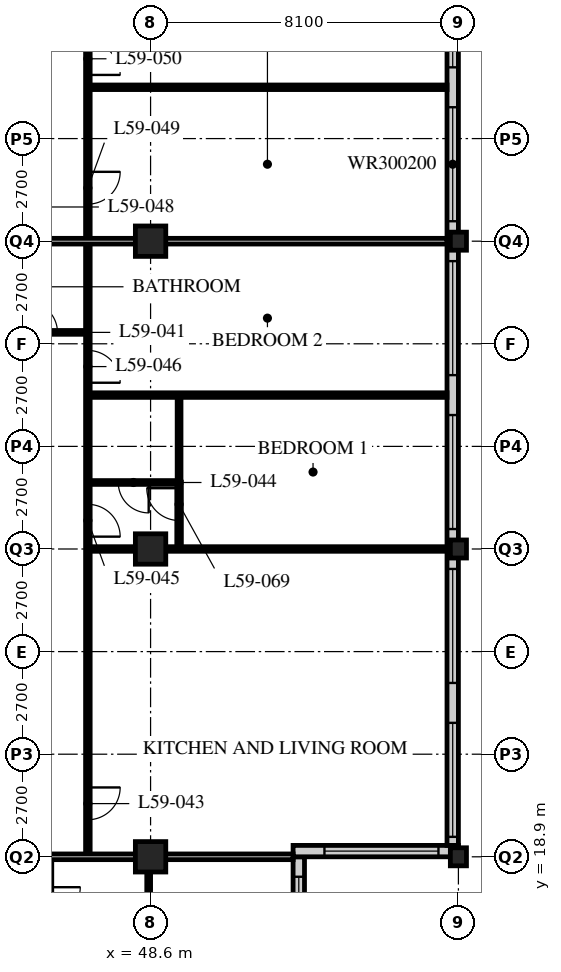
"""IFC4 building model, lengths in metres.
Left out: names, types, materials, properties, quantities, classifications, styles, units other than length and angle.
Written with IfcOpenShell. Run it as: python <this file> out.ifc"""

import sys

from ifc_helpers import new_model, si_unit, direction, frame, frame_2d, origin, origin_2d, place, context, subcontext, project, spatial, rectangle, hollow_rectangle, i_section, extrude, element, fill, save


model = new_model("IFC4")
c1 = context("Model", 3, precision=1e-05, world=origin(), true_north=direction((0.0, 1.0)))
c2 = subcontext(c1, "Body", "Model", "MODEL_VIEW")
j1 = project(units=[si_unit("LENGTHUNIT", "METRE"), si_unit("PLANEANGLEUNIT", "RADIAN")], contexts=[c1])
p1 = place(None, origin())
s1 = spatial("IfcSite", under=j1, at=p1, CompositionType="ELEMENT")
p2 = place(p1, origin())
s2 = spatial("IfcBuilding", under=s1, at=p2, CompositionType="ELEMENT")
p3 = place(p2, frame((0.0, 0.0, 228.0)))
s3 = spatial("IfcBuildingStorey", under=s2, at=p3, CompositionType="ELEMENT", Elevation=228.0)
for number, where, z_axis, x_axis in (
    (1, (48.6, 18.9, 0.0), (0.0, 0.0, 1.0), (1.0, 0.0, 0.0)),
    (2, (48.6, 27.0, 0.0), (0.0, 0.0, 1.0), (1.0, 0.0, 0.0)),
    (3, (48.6, 35.1, 0.0), (0.0, 0.0, 1.0), (1.0, 0.0, 0.0)),
):
    element("IfcColumn", number, at=place(p3, frame(where, z_axis=z_axis, x_axis=x_axis)), inside=s3, PredefinedType="COLUMN", context=c2, shape_type="SweptSolid", body=[
        extrude(hollow_rectangle(XDim=0.8, YDim=0.8, WallThickness=0.08, at=origin_2d()), origin(), (0.0, 0.0, 1.0), 3.6),
    ])
for number, where, z_axis, x_axis in (
    (4, (56.7, 18.9, 0.0), (0.0, 0.0, 1.0), (1.0, 0.0, 0.0)),
    (5, (56.7, 27.0, 0.0), (0.0, 0.0, 1.0), (1.0, 0.0, 0.0)),
    (6, (56.7, 35.1, 0.0), (0.0, 0.0, 1.0), (1.0, 0.0, 0.0)),
):
    element("IfcColumn", number, at=place(p3, frame(where, z_axis=z_axis, x_axis=x_axis)), inside=s3, PredefinedType="COLUMN", context=c2, shape_type="SweptSolid", body=[
        extrude(i_section(OverallWidth=0.424, OverallDepth=0.475, WebThickness=0.048, FlangeThickness=0.077, FilletRadius=0.015, at=origin_2d()), origin(), (0.0, 0.0, 1.0), 3.6),
    ])
p4 = place(p3, frame((52.5, 15.15, 0.0), z_axis=(0.0, 0.0, 1.0), x_axis=(0.0, 1.0, 0.0)))
e7 = element("IfcWall", 7, at=p4, inside=s3, PredefinedType="SOLIDWALL", context=c2, shape_type="SweptSolid", body=[
    extrude(rectangle(XDim=3.75, YDim=0.3, at=frame_2d((1.875, 0.0))), origin(), (0.0, 0.0, 1.0), 3.39),
])
p5 = place(p4, frame((0.225, 0.0, 0.6)))
e8 = element("IfcOpeningElement", 8, at=p5, cuts=e7, PredefinedType="OPENING", context=c2, shape_type="SweptSolid", body=[
    extrude(rectangle(XDim=3.0, YDim=2.0, at=frame_2d((1.5, 1.0))), frame((0.0, 0.16, 0.0), z_axis=(0.0, -1.0, 0.0), x_axis=(1.0, 0.0, 0.0)), (0.0, 0.0, 1.0), 0.32),
])
p6 = place(p3, frame((52.35, 19.05, 0.0), z_axis=(0.0, 0.0, 1.0), x_axis=(1.0, 0.0, 0.0)))
e9 = element("IfcWall", 9, at=p6, inside=s3, PredefinedType="SOLIDWALL", context=c2, shape_type="SweptSolid", body=[
    extrude(rectangle(XDim=4.35, YDim=0.3, at=frame_2d((2.175, 0.0))), origin(), (0.0, 0.0, 1.0), 3.39),
])
p7 = place(p6, frame((0.825, 0.0, 0.6)))
e10 = element("IfcOpeningElement", 10, at=p7, cuts=e9, PredefinedType="OPENING", context=c2, shape_type="SweptSolid", body=[
    extrude(rectangle(XDim=3.0, YDim=2.0, at=frame_2d((1.5, 1.0))), frame((0.0, 0.16, 0.0), z_axis=(0.0, -1.0, 0.0), x_axis=(1.0, 0.0, 0.0)), (0.0, 0.0, 1.0), 0.32),
])
p8 = place(p3, frame((56.55, 19.2, 0.0), z_axis=(0.0, 0.0, 1.0), x_axis=(0.0, 1.0, 0.0)))
e11 = element("IfcWall", 11, at=p8, inside=s3, PredefinedType="SOLIDWALL", context=c2, shape_type="SweptSolid", body=[
    extrude(rectangle(XDim=32.1, YDim=0.3, at=frame_2d((16.05, 0.0))), origin(), (0.0, 0.0, 1.0), 3.39),
])
p9 = place(p8, frame((0.225, 0.0, 0.6)))
e12 = element("IfcOpeningElement", 12, at=p9, cuts=e11, PredefinedType="OPENING", context=c2, shape_type="SweptSolid", body=[
    extrude(rectangle(XDim=3.0, YDim=2.0, at=frame_2d((1.5, 1.0))), frame((0.0, 0.16, 0.0), z_axis=(0.0, -1.0, 0.0), x_axis=(1.0, 0.0, 0.0)), (0.0, 0.0, 1.0), 0.32),
])
p10 = place(p8, frame((4.275, 0.0, 0.6)))
e13 = element("IfcOpeningElement", 13, at=p10, cuts=e11, PredefinedType="OPENING", context=c2, shape_type="SweptSolid", body=[
    extrude(rectangle(XDim=3.0, YDim=2.0, at=frame_2d((1.5, 1.0))), frame((0.0, 0.16, 0.0), z_axis=(0.0, -1.0, 0.0), x_axis=(1.0, 0.0, 0.0)), (0.0, 0.0, 1.0), 0.32),
])
p11 = place(p8, frame((8.325, 0.0, 0.6)))
e14 = element("IfcOpeningElement", 14, at=p11, cuts=e11, PredefinedType="OPENING", context=c2, shape_type="SweptSolid", body=[
    extrude(rectangle(XDim=3.0, YDim=2.0, at=frame_2d((1.5, 1.0))), frame((0.0, 0.16, 0.0), z_axis=(0.0, -1.0, 0.0), x_axis=(1.0, 0.0, 0.0)), (0.0, 0.0, 1.0), 0.32),
])
p12 = place(p8, frame((12.375, 0.0, 0.6)))
e15 = element("IfcOpeningElement", 15, at=p12, cuts=e11, PredefinedType="OPENING", context=c2, shape_type="SweptSolid", body=[
    extrude(rectangle(XDim=3.0, YDim=2.0, at=frame_2d((1.5, 1.0))), frame((0.0, 0.16, 0.0), z_axis=(0.0, -1.0, 0.0), x_axis=(1.0, 0.0, 0.0)), (0.0, 0.0, 1.0), 0.32),
])
p13 = place(p8, frame((16.425, 0.0, 0.6)))
e16 = element("IfcOpeningElement", 16, at=p13, cuts=e11, PredefinedType="OPENING", context=c2, shape_type="SweptSolid", body=[
    extrude(rectangle(XDim=3.0, YDim=2.0, at=frame_2d((1.5, 1.0))), frame((0.0, 0.16, 0.0), z_axis=(0.0, -1.0, 0.0), x_axis=(1.0, 0.0, 0.0)), (0.0, 0.0, 1.0), 0.32),
])
p14 = place(p8, frame((20.475, 0.0, 0.6)))
e17 = element("IfcOpeningElement", 17, at=p14, cuts=e11, PredefinedType="OPENING", context=c2, shape_type="SweptSolid", body=[
    extrude(rectangle(XDim=3.0, YDim=2.0, at=frame_2d((1.5, 1.0))), frame((0.0, 0.16, 0.0), z_axis=(0.0, -1.0, 0.0), x_axis=(1.0, 0.0, 0.0)), (0.0, 0.0, 1.0), 0.32),
])
p15 = place(p8, frame((24.525, 0.0, 0.6)))
e18 = element("IfcOpeningElement", 18, at=p15, cuts=e11, PredefinedType="OPENING", context=c2, shape_type="SweptSolid", body=[
    extrude(rectangle(XDim=3.0, YDim=2.0, at=frame_2d((1.5, 1.0))), frame((0.0, 0.16, 0.0), z_axis=(0.0, -1.0, 0.0), x_axis=(1.0, 0.0, 0.0)), (0.0, 0.0, 1.0), 0.32),
])
p16 = place(p8, frame((28.575, 0.0, 0.6)))
e19 = element("IfcOpeningElement", 19, at=p16, cuts=e11, PredefinedType="OPENING", context=c2, shape_type="SweptSolid", body=[
    extrude(rectangle(XDim=3.0, YDim=2.0, at=frame_2d((1.5, 1.0))), frame((0.0, 0.16, 0.0), z_axis=(0.0, -1.0, 0.0), x_axis=(1.0, 0.0, 0.0)), (0.0, 0.0, 1.0), 0.32),
])
p17 = place(p3, frame((46.95, 18.9, 0.0), z_axis=(0.0, 0.0, 1.0), x_axis=(0.0, 1.0, 0.0)))
e20 = element("IfcWall", 20, at=p17, inside=s3, PredefinedType="PARTITIONING", context=c2, shape_type="SweptSolid", body=[
    extrude(rectangle(XDim=24.3, YDim=0.12, at=frame_2d((12.15, 0.0))), origin(), (0.0, 0.0, 1.0), 3.39),
])
p18 = place(p17, frame((0.975, 0.0, 0.0)))
e21 = element("IfcOpeningElement", 21, at=p18, cuts=e20, PredefinedType="OPENING", context=c2, shape_type="SweptSolid", body=[
    extrude(rectangle(XDim=0.85, YDim=2.1, at=frame_2d((0.425, 1.05))), frame((0.0, 0.07, 0.0), z_axis=(0.0, -1.0, 0.0), x_axis=(1.0, 0.0, 0.0)), (0.0, 0.0, 1.0), 0.14),
])
p19 = place(p17, frame((8.425, 0.0, 0.0)))
e22 = element("IfcOpeningElement", 22, at=p19, cuts=e20, PredefinedType="OPENING", context=c2, shape_type="SweptSolid", body=[
    extrude(rectangle(XDim=0.85, YDim=2.1, at=frame_2d((0.425, 1.05))), frame((0.0, 0.07, 0.0), z_axis=(0.0, -1.0, 0.0), x_axis=(1.0, 0.0, 0.0)), (0.0, 0.0, 1.0), 0.14),
])
p20 = place(p17, frame((12.475, 0.0, 0.0)))
e23 = element("IfcOpeningElement", 23, at=p20, cuts=e20, PredefinedType="OPENING", context=c2, shape_type="SweptSolid", body=[
    extrude(rectangle(XDim=0.85, YDim=2.1, at=frame_2d((0.425, 1.05))), frame((0.0, 0.07, 0.0), z_axis=(0.0, -1.0, 0.0), x_axis=(1.0, 0.0, 0.0)), (0.0, 0.0, 1.0), 0.14),
])
p21 = place(p17, frame((17.175, 0.0, 0.0)))
e24 = element("IfcOpeningElement", 24, at=p21, cuts=e20, PredefinedType="OPENING", context=c2, shape_type="SweptSolid", body=[
    extrude(rectangle(XDim=0.85, YDim=2.1, at=frame_2d((0.425, 1.05))), frame((0.0, 0.07, 0.0), z_axis=(0.0, -1.0, 0.0), x_axis=(1.0, 0.0, 0.0)), (0.0, 0.0, 1.0), 0.14),
])
p22 = place(p17, frame((20.575, 0.0, 0.0)))
e25 = element("IfcOpeningElement", 25, at=p22, cuts=e20, PredefinedType="OPENING", context=c2, shape_type="SweptSolid", body=[
    extrude(rectangle(XDim=0.85, YDim=2.1, at=frame_2d((0.425, 1.05))), frame((0.0, 0.07, 0.0), z_axis=(0.0, -1.0, 0.0), x_axis=(1.0, 0.0, 0.0)), (0.0, 0.0, 1.0), 0.14),
])
p23 = place(p3, frame((44.55, 32.7, 0.0), z_axis=(0.0, 0.0, 1.0), x_axis=(1.0, 0.0, 0.0)))
e26 = element("IfcWall", 26, at=p23, inside=s3, PredefinedType="PARTITIONING", context=c2, shape_type="SweptSolid", body=[
    extrude(rectangle(XDim=2.4, YDim=0.1, at=frame_2d((1.2, 0.0))), origin(), (0.0, 0.0, 1.0), 3.39),
])
p24 = place(p23, frame((0.8, 0.0, 0.0)))
e27 = element("IfcOpeningElement", 27, at=p24, cuts=e26, PredefinedType="OPENING", context=c2, shape_type="SweptSolid", body=[
    extrude(rectangle(XDim=0.8, YDim=2.1, at=frame_2d((0.4, 1.05))), frame((0.0, 0.06, 0.0), z_axis=(0.0, -1.0, 0.0), x_axis=(1.0, 0.0, 0.0)), (0.0, 0.0, 1.0), 0.12),
])
p25 = place(p3, frame((46.95, 28.75, 0.0), z_axis=(0.0, 0.0, 1.0), x_axis=(1.0, 0.0, 0.0)))
e28 = element("IfcWall", 28, at=p25, inside=s3, PredefinedType="PARTITIONING", context=c2, shape_type="SweptSolid", body=[
    extrude(rectangle(XDim=2.4, YDim=0.1, at=frame_2d((1.2, 0.0))), origin(), (0.0, 0.0, 1.0), 3.39),
])
p26 = place(p25, frame((0.8, 0.0, 0.0)))
e29 = element("IfcOpeningElement", 29, at=p26, cuts=e28, PredefinedType="OPENING", context=c2, shape_type="SweptSolid", body=[
    extrude(rectangle(XDim=0.8, YDim=2.1, at=frame_2d((0.4, 1.05))), frame((0.0, 0.06, 0.0), z_axis=(0.0, -1.0, 0.0), x_axis=(1.0, 0.0, 0.0)), (0.0, 0.0, 1.0), 0.12),
])
p27 = place(p3, frame((49.35, 28.75, 0.0), z_axis=(0.0, 0.0, 1.0), x_axis=(0.0, 1.0, 0.0)))
e30 = element("IfcWall", 30, at=p27, inside=s3, PredefinedType="PARTITIONING", context=c2, shape_type="SweptSolid", body=[
    extrude(rectangle(XDim=2.3, YDim=0.1, at=frame_2d((1.15, 0.0))), origin(), (0.0, 0.0, 1.0), 3.39),
])
p28 = place(p3, frame((46.95, 27.0, 0.0), z_axis=(0.0, 0.0, 1.0), x_axis=(1.0, 0.0, 0.0)))
e31 = element("IfcWall", 31, at=p28, inside=s3, PredefinedType="PARTITIONING", context=c2, shape_type="SweptSolid", body=[
    extrude(rectangle(XDim=9.45, YDim=0.12, at=frame_2d((4.725, 0.0))), origin(), (0.0, 0.0, 1.0), 2.628),
])
p29 = place(p3, frame((46.95, 31.05, 0.0), z_axis=(0.0, 0.0, 1.0), x_axis=(1.0, 0.0, 0.0)))
e32 = element("IfcWall", 32, at=p29, inside=s3, PredefinedType="PARTITIONING", context=c2, shape_type="SweptSolid", body=[
    extrude(rectangle(XDim=9.45, YDim=0.12, at=frame_2d((4.725, 0.0))), origin(), (0.0, 0.0, 1.0), 3.39),
])
p30 = place(p3, frame((44.55, 35.1, 0.0), z_axis=(0.0, 0.0, 1.0), x_axis=(1.0, 0.0, 0.0)))
e33 = element("IfcWall", 33, at=p30, inside=s3, PredefinedType="PARTITIONING", context=c2, shape_type="SweptSolid", body=[
    extrude(rectangle(XDim=11.85, YDim=0.15, at=frame_2d((5.925, 0.0))), origin(), (0.0, 0.0, 1.0), 2.628),
])
p31 = place(p3, frame((46.95, 39.15, 0.0), z_axis=(0.0, 0.0, 1.0), x_axis=(1.0, 0.0, 0.0)))
e34 = element("IfcWall", 34, at=p31, inside=s3, PredefinedType="PARTITIONING", context=c2, shape_type="SweptSolid", body=[
    extrude(rectangle(XDim=9.45, YDim=0.12, at=frame_2d((4.725, 0.0))), origin(), (0.0, 0.0, 1.0), 3.39),
])
p32 = place(p3, frame((48.55, 18.9, 0.0), z_axis=(0.0, 0.0, 1.0), x_axis=(0.0, -1.0, 0.0)))
e35 = element("IfcWall", 35, at=p32, inside=s3, PredefinedType="PARTITIONING", context=c2, shape_type="SweptSolid", body=[
    extrude(rectangle(XDim=2.4, YDim=0.1, at=frame_2d((1.2, 0.0))), origin(), (0.0, 0.0, 1.0), 2.628),
])
p33 = place(p3, frame((44.55, 18.9, 0.0), z_axis=(0.0, 0.0, 1.0), x_axis=(1.0, 0.0, 0.0)))
e36 = element("IfcWall", 36, at=p33, inside=s3, PredefinedType="PARTITIONING", context=c2, shape_type="SweptSolid", body=[
    extrude(rectangle(XDim=7.8, YDim=0.15, at=frame_2d((3.9, 0.0))), origin(), (0.0, 0.0, 1.0), 2.628),
])
p34 = place(p3, frame((49.35, 28.76, 0.0), z_axis=(0.0, 0.0, 1.0), x_axis=(0.0, -1.0, 0.0)))
e37 = element("IfcWall", 37, at=p34, inside=s3, PredefinedType="PARTITIONING", context=c2, shape_type="SweptSolid", body=[
    extrude(rectangle(XDim=1.76, YDim=0.12, at=frame_2d((0.88, 0.0))), origin(), (0.0, 0.0, 1.0), 3.39),
])
p35 = place(p34, frame((0.16, 0.0, 0.0)))
e38 = element("IfcOpeningElement", 38, at=p35, cuts=e37, PredefinedType="OPENING", context=c2, shape_type="SweptSolid", body=[
    extrude(rectangle(XDim=0.85, YDim=2.1, at=frame_2d((0.425, 1.05))), frame((0.0, 0.07, 0.0), z_axis=(0.0, -1.0, 0.0), x_axis=(1.0, 0.0, 0.0)), (0.0, 0.0, 1.0), 0.14),
])
p36 = place(p5, origin())
e39 = element("IfcWindow", 39, at=p36, inside=s3, PartitioningType="SINGLE_PANEL", PredefinedType="WINDOW", context=c2, shape_type="SweptSolid", body=[
    extrude(rectangle(XDim=3.0, YDim=2.0, at=frame_2d((1.5, 1.0))), frame((0.0, 0.03, 0.0), z_axis=(0.0, -1.0, 0.0), x_axis=(1.0, 0.0, 0.0)), (0.0, 0.0, 1.0), 0.06),
])
fill(e8, e39)
p37 = place(p7, origin())
e40 = element("IfcWindow", 40, at=p37, inside=s3, PartitioningType="SINGLE_PANEL", PredefinedType="WINDOW", context=c2, shape_type="SweptSolid", body=[
    extrude(rectangle(XDim=3.0, YDim=2.0, at=frame_2d((1.5, 1.0))), frame((0.0, 0.03, 0.0), z_axis=(0.0, -1.0, 0.0), x_axis=(1.0, 0.0, 0.0)), (0.0, 0.0, 1.0), 0.06),
])
fill(e10, e40)
p38 = place(p9, origin())
e41 = element("IfcWindow", 41, at=p38, inside=s3, PartitioningType="SINGLE_PANEL", PredefinedType="WINDOW", context=c2, shape_type="SweptSolid", body=[
    extrude(rectangle(XDim=3.0, YDim=2.0, at=frame_2d((1.5, 1.0))), frame((0.0, 0.03, 0.0), z_axis=(0.0, -1.0, 0.0), x_axis=(1.0, 0.0, 0.0)), (0.0, 0.0, 1.0), 0.06),
])
fill(e12, e41)
p39 = place(p10, origin())
e42 = element("IfcWindow", 42, at=p39, inside=s3, PartitioningType="SINGLE_PANEL", PredefinedType="WINDOW", context=c2, shape_type="SweptSolid", body=[
    extrude(rectangle(XDim=3.0, YDim=2.0, at=frame_2d((1.5, 1.0))), frame((0.0, 0.03, 0.0), z_axis=(0.0, -1.0, 0.0), x_axis=(1.0, 0.0, 0.0)), (0.0, 0.0, 1.0), 0.06),
])
fill(e13, e42)
p40 = place(p11, origin())
e43 = element("IfcWindow", 43, at=p40, inside=s3, PartitioningType="SINGLE_PANEL", PredefinedType="WINDOW", context=c2, shape_type="SweptSolid", body=[
    extrude(rectangle(XDim=3.0, YDim=2.0, at=frame_2d((1.5, 1.0))), frame((0.0, 0.03, 0.0), z_axis=(0.0, -1.0, 0.0), x_axis=(1.0, 0.0, 0.0)), (0.0, 0.0, 1.0), 0.06),
])
fill(e14, e43)
p41 = place(p12, origin())
e44 = element("IfcWindow", 44, at=p41, inside=s3, PartitioningType="SINGLE_PANEL", PredefinedType="WINDOW", context=c2, shape_type="SweptSolid", body=[
    extrude(rectangle(XDim=3.0, YDim=2.0, at=frame_2d((1.5, 1.0))), frame((0.0, 0.03, 0.0), z_axis=(0.0, -1.0, 0.0), x_axis=(1.0, 0.0, 0.0)), (0.0, 0.0, 1.0), 0.06),
])
fill(e15, e44)
p42 = place(p13, origin())
e45 = element("IfcWindow", 45, at=p42, inside=s3, PartitioningType="SINGLE_PANEL", PredefinedType="WINDOW", context=c2, shape_type="SweptSolid", body=[
    extrude(rectangle(XDim=3.0, YDim=2.0, at=frame_2d((1.5, 1.0))), frame((0.0, 0.03, 0.0), z_axis=(0.0, -1.0, 0.0), x_axis=(1.0, 0.0, 0.0)), (0.0, 0.0, 1.0), 0.06),
])
fill(e16, e45)
p43 = place(p14, origin())
e46 = element("IfcWindow", 46, at=p43, inside=s3, PartitioningType="SINGLE_PANEL", PredefinedType="WINDOW", context=c2, shape_type="SweptSolid", body=[
    extrude(rectangle(XDim=3.0, YDim=2.0, at=frame_2d((1.5, 1.0))), frame((0.0, 0.03, 0.0), z_axis=(0.0, -1.0, 0.0), x_axis=(1.0, 0.0, 0.0)), (0.0, 0.0, 1.0), 0.06),
])
fill(e17, e46)
p44 = place(p24, origin())
e47 = element("IfcDoor", 47, at=p44, inside=s3, OperationType="SINGLE_SWING_LEFT", PredefinedType="DOOR", context=c2, shape_type="SweptSolid", body=[
    extrude(rectangle(XDim=0.8, YDim=2.1, at=frame_2d((0.4, 1.05))), frame((0.0, 0.025, 0.0), z_axis=(0.0, -1.0, 0.0), x_axis=(1.0, 0.0, 0.0)), (0.0, 0.0, 1.0), 0.05),
])
fill(e27, e47)
p45 = place(p18, origin())
e48 = element("IfcDoor", 48, at=p45, inside=s3, OperationType="SINGLE_SWING_LEFT", PredefinedType="DOOR", context=c2, shape_type="SweptSolid", body=[
    extrude(rectangle(XDim=0.85, YDim=2.1, at=frame_2d((0.425, 1.05))), frame((0.0, 0.025, 0.0), z_axis=(0.0, -1.0, 0.0), x_axis=(1.0, 0.0, 0.0)), (0.0, 0.0, 1.0), 0.05),
])
fill(e21, e48)
p46 = place(p26, origin())
e49 = element("IfcDoor", 49, at=p46, inside=s3, OperationType="SINGLE_SWING_LEFT", PredefinedType="DOOR", context=c2, shape_type="SweptSolid", body=[
    extrude(rectangle(XDim=0.8, YDim=2.1, at=frame_2d((0.4, 1.05))), frame((0.0, 0.025, 0.0), z_axis=(0.0, -1.0, 0.0), x_axis=(1.0, 0.0, 0.0)), (0.0, 0.0, 1.0), 0.05),
])
fill(e29, e49)
p47 = place(p19, origin())
e50 = element("IfcDoor", 50, at=p47, inside=s3, OperationType="SINGLE_SWING_RIGHT", PredefinedType="DOOR", context=c2, shape_type="SweptSolid", body=[
    extrude(rectangle(XDim=0.85, YDim=2.1, at=frame_2d((0.425, 1.05))), frame((0.0, 0.025, 0.0), z_axis=(0.0, -1.0, 0.0), x_axis=(1.0, 0.0, 0.0)), (0.0, 0.0, 1.0), 0.05),
])
fill(e22, e50)
p48 = place(p20, origin())
e51 = element("IfcDoor", 51, at=p48, inside=s3, OperationType="SINGLE_SWING_RIGHT", PredefinedType="DOOR", context=c2, shape_type="SweptSolid", body=[
    extrude(rectangle(XDim=0.85, YDim=2.1, at=frame_2d((0.425, 1.05))), frame((0.0, 0.025, 0.0), z_axis=(0.0, -1.0, 0.0), x_axis=(1.0, 0.0, 0.0)), (0.0, 0.0, 1.0), 0.05),
])
fill(e23, e51)
p49 = place(p21, origin())
e52 = element("IfcDoor", 52, at=p49, inside=s3, OperationType="SINGLE_SWING_LEFT", PredefinedType="DOOR", context=c2, shape_type="SweptSolid", body=[
    extrude(rectangle(XDim=0.85, YDim=2.1, at=frame_2d((0.425, 1.05))), frame((0.0, 0.025, 0.0), z_axis=(0.0, -1.0, 0.0), x_axis=(1.0, 0.0, 0.0)), (0.0, 0.0, 1.0), 0.05),
])
fill(e24, e52)
p50 = place(p22, origin())
e53 = element("IfcDoor", 53, at=p50, inside=s3, OperationType="SINGLE_SWING_RIGHT", PredefinedType="DOOR", context=c2, shape_type="SweptSolid", body=[
    extrude(rectangle(XDim=0.85, YDim=2.1, at=frame_2d((0.425, 1.05))), frame((0.0, 0.025, 0.0), z_axis=(0.0, -1.0, 0.0), x_axis=(1.0, 0.0, 0.0)), (0.0, 0.0, 1.0), 0.05),
])
fill(e25, e53)
p51 = place(p35, origin())
e54 = element("IfcDoor", 54, at=p51, inside=s3, OperationType="SINGLE_SWING_RIGHT", PredefinedType="DOOR", context=c2, shape_type="SweptSolid", body=[
    extrude(rectangle(XDim=0.85, YDim=2.1, at=frame_2d((0.425, 1.05))), frame((0.0, 0.025, 0.0), z_axis=(0.0, -1.0, 0.0), x_axis=(1.0, 0.0, 0.0)), (0.0, 0.0, 1.0), 0.05),
])
fill(e38, e54)
save(model, sys.argv[1])
